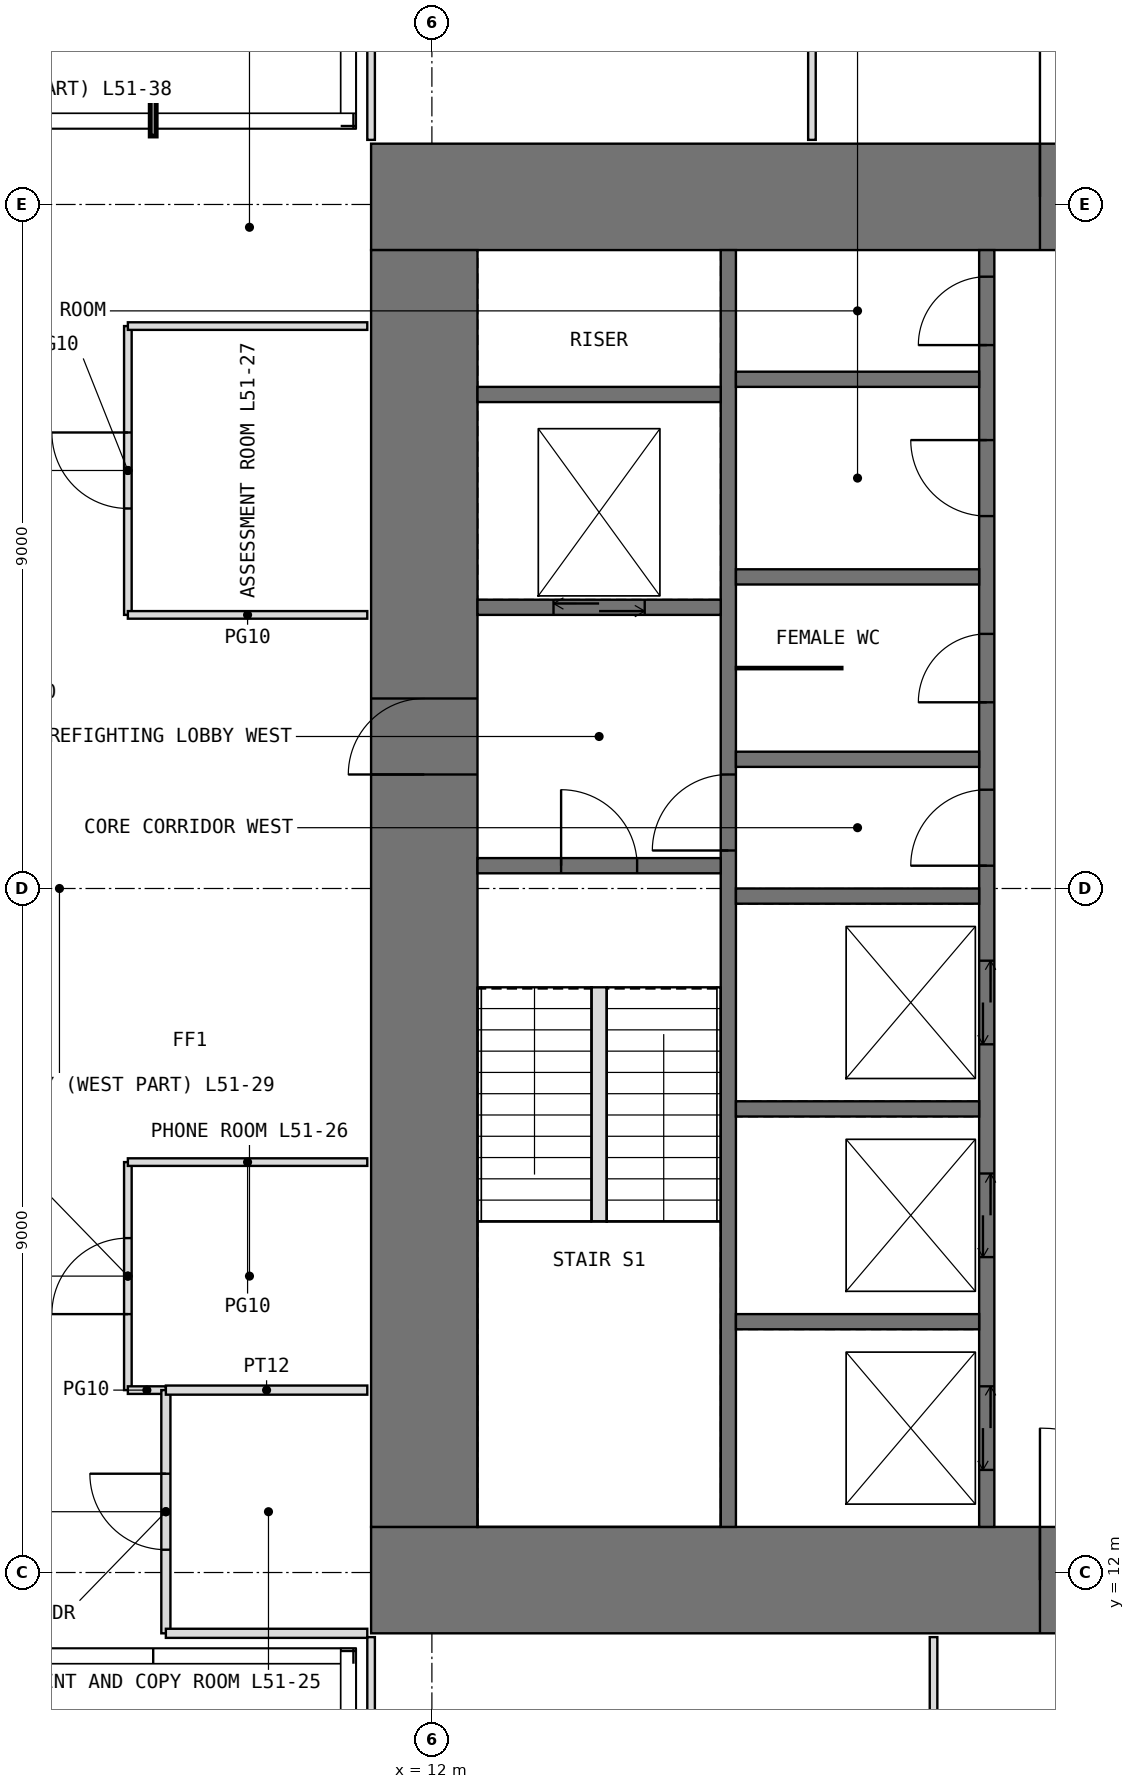
"""IFC4 building model, lengths in metres.
Left out: names, types, materials, properties, quantities, classifications, styles, units other than length and angle.
Written with IfcOpenShell. Run it as: python <this file> out.ifc"""

import sys

from ifc_helpers import new_model, si_unit, direction, frame, frame_2d, origin, place, context, subcontext, project, spatial, rectangle, extrude, element, fill, save


model = new_model("IFC4")
c1 = context("Model", 3, precision=1e-05, world=origin(), true_north=direction((0.0, 1.0)))
c2 = subcontext(c1, "Body", "Model", "MODEL_VIEW")
j1 = project(units=[si_unit("LENGTHUNIT", "METRE"), si_unit("PLANEANGLEUNIT", "RADIAN")], contexts=[c1])
p1 = place(None, origin())
s1 = spatial("IfcSite", under=j1, at=p1, CompositionType="ELEMENT")
p2 = place(p1, origin())
s2 = spatial("IfcBuilding", under=s1, at=p2, CompositionType="ELEMENT")
p3 = place(p2, frame((0.0, 0.0, 214.5)))
s3 = spatial("IfcBuildingStorey", under=s2, at=p3, CompositionType="ELEMENT", Elevation=214.5)
p4 = place(p3, frame((11.2, 11.9, -0.05), z_axis=(0.0, 0.0, 1.0), x_axis=(1.0, 0.0, 0.0)))
e1 = element("IfcWall", 1, at=p4, inside=s3, PredefinedType="SHEAR", context=c2, shape_type="SweptSolid", body=[
    extrude(rectangle(XDim=19.6, YDim=1.4, at=frame_2d((9.8, 0.0))), origin(), (0.0, 0.0, 1.0), 4.0),
])
p5 = place(p4, frame((8.8, 0.0, 0.05)))
e2 = element("IfcOpeningElement", 2, at=p5, cuts=e1, PredefinedType="OPENING", context=c2, shape_type="SweptSolid", body=[
    extrude(rectangle(XDim=2.0, YDim=2.2, at=frame_2d((1.0, 1.1))), frame((0.0, 0.71, 0.0), z_axis=(0.0, -1.0, 0.0), x_axis=(1.0, 0.0, 0.0)), (0.0, 0.0, 1.0), 1.42),
])
p6 = place(p3, frame((11.2, 30.1, -0.05), z_axis=(0.0, 0.0, 1.0), x_axis=(1.0, 0.0, 0.0)))
e3 = element("IfcWall", 3, at=p6, inside=s3, PredefinedType="SHEAR", context=c2, shape_type="SweptSolid", body=[
    extrude(rectangle(XDim=19.6, YDim=1.4, at=frame_2d((9.8, 0.0))), origin(), (0.0, 0.0, 1.0), 4.0),
])
p7 = place(p6, frame((8.8, 0.0, 0.05)))
e4 = element("IfcOpeningElement", 4, at=p7, cuts=e3, PredefinedType="OPENING", context=c2, shape_type="SweptSolid", body=[
    extrude(rectangle(XDim=2.0, YDim=2.2, at=frame_2d((1.0, 1.1))), frame((0.0, 0.71, 0.0), z_axis=(0.0, -1.0, 0.0), x_axis=(1.0, 0.0, 0.0)), (0.0, 0.0, 1.0), 1.42),
])
p8 = place(p3, frame((11.9, 12.6, -0.05), z_axis=(0.0, 0.0, 1.0), x_axis=(0.0, 1.0, 0.0)))
e5 = element("IfcWall", 5, at=p8, inside=s3, PredefinedType="SHEAR", context=c2, shape_type="SweptSolid", body=[
    extrude(rectangle(XDim=16.8, YDim=1.4, at=frame_2d((8.4, 0.0))), origin(), (0.0, 0.0, 1.0), 4.0),
])
p9 = place(p8, frame((9.9, 0.0, 0.05)))
e6 = element("IfcOpeningElement", 6, at=p9, cuts=e5, PredefinedType="OPENING", context=c2, shape_type="SweptSolid", body=[
    extrude(rectangle(XDim=1.0, YDim=2.2, at=frame_2d((0.5, 1.1))), frame((0.0, 0.71, 0.0), z_axis=(0.0, -1.0, 0.0), x_axis=(1.0, 0.0, 0.0)), (0.0, 0.0, 1.0), 1.42),
])
p10 = place(p3, frame((15.9, 12.6, -0.05), z_axis=(0.0, 0.0, 1.0), x_axis=(0.0, 1.0, 0.0)))
e7 = element("IfcWall", 7, at=p10, inside=s3, PredefinedType="SHEAR", context=c2, shape_type="SweptSolid", body=[
    extrude(rectangle(XDim=16.8, YDim=0.2, at=frame_2d((8.4, 0.0))), origin(), (0.0, 0.0, 1.0), 4.0),
])
p11 = place(p10, frame((8.9, 0.0, 0.05)))
e8 = element("IfcOpeningElement", 8, at=p11, cuts=e7, PredefinedType="OPENING", context=c2, shape_type="SweptSolid", body=[
    extrude(rectangle(XDim=1.0, YDim=2.2, at=frame_2d((0.5, 1.1))), frame((0.0, 0.11, 0.0), z_axis=(0.0, -1.0, 0.0), x_axis=(1.0, 0.0, 0.0)), (0.0, 0.0, 1.0), 0.22),
])
p12 = place(p3, frame((19.3, 12.6, -0.05), z_axis=(0.0, 0.0, 1.0), x_axis=(0.0, 1.0, 0.0)))
e9 = element("IfcWall", 9, at=p12, inside=s3, PredefinedType="SHEAR", context=c2, shape_type="SweptSolid", body=[
    extrude(rectangle(XDim=16.8, YDim=0.2, at=frame_2d((8.4, 0.0))), origin(), (0.0, 0.0, 1.0), 4.0),
])
p13 = place(p12, frame((8.7, 0.0, 0.05)))
e10 = element("IfcOpeningElement", 10, at=p13, cuts=e9, PredefinedType="OPENING", context=c2, shape_type="SweptSolid", body=[
    extrude(rectangle(XDim=1.0, YDim=2.2, at=frame_2d((0.5, 1.1))), frame((0.0, 0.11, 0.0), z_axis=(0.0, -1.0, 0.0), x_axis=(1.0, 0.0, 0.0)), (0.0, 0.0, 1.0), 0.22),
])
p14 = place(p12, frame((10.85, 0.0, 0.05)))
e11 = element("IfcOpeningElement", 11, at=p14, cuts=e9, PredefinedType="OPENING", context=c2, shape_type="SweptSolid", body=[
    extrude(rectangle(XDim=0.9, YDim=2.2, at=frame_2d((0.45, 1.1))), frame((0.0, 0.11, 0.0), z_axis=(0.0, -1.0, 0.0), x_axis=(1.0, 0.0, 0.0)), (0.0, 0.0, 1.0), 0.22),
])
p15 = place(p12, frame((13.3, 0.0, 0.05)))
e12 = element("IfcOpeningElement", 12, at=p15, cuts=e9, PredefinedType="OPENING", context=c2, shape_type="SweptSolid", body=[
    extrude(rectangle(XDim=1.0, YDim=2.2, at=frame_2d((0.5, 1.1))), frame((0.0, 0.11, 0.0), z_axis=(0.0, -1.0, 0.0), x_axis=(1.0, 0.0, 0.0)), (0.0, 0.0, 1.0), 0.22),
])
p16 = place(p12, frame((15.55, 0.0, 0.05)))
e13 = element("IfcOpeningElement", 13, at=p16, cuts=e9, PredefinedType="OPENING", context=c2, shape_type="SweptSolid", body=[
    extrude(rectangle(XDim=0.9, YDim=2.2, at=frame_2d((0.45, 1.1))), frame((0.0, 0.11, 0.0), z_axis=(0.0, -1.0, 0.0), x_axis=(1.0, 0.0, 0.0)), (0.0, 0.0, 1.0), 0.22),
])
p17 = place(p12, frame((0.75, 0.0, 0.05)))
e14 = element("IfcOpeningElement", 14, at=p17, cuts=e9, PredefinedType="OPENING", context=c2, shape_type="SweptSolid", body=[
    extrude(rectangle(XDim=1.1, YDim=2.2, at=frame_2d((0.55, 1.1))), frame((0.0, 0.11, 0.0), z_axis=(0.0, -1.0, 0.0), x_axis=(1.0, 0.0, 0.0)), (0.0, 0.0, 1.0), 0.22),
])
p18 = place(p12, frame((3.55, 0.0, 0.05)))
e15 = element("IfcOpeningElement", 15, at=p18, cuts=e9, PredefinedType="OPENING", context=c2, shape_type="SweptSolid", body=[
    extrude(rectangle(XDim=1.1, YDim=2.2, at=frame_2d((0.55, 1.1))), frame((0.0, 0.11, 0.0), z_axis=(0.0, -1.0, 0.0), x_axis=(1.0, 0.0, 0.0)), (0.0, 0.0, 1.0), 0.22),
])
p19 = place(p12, frame((6.35, 0.0, 0.05)))
e16 = element("IfcOpeningElement", 16, at=p19, cuts=e9, PredefinedType="OPENING", context=c2, shape_type="SweptSolid", body=[
    extrude(rectangle(XDim=1.1, YDim=2.2, at=frame_2d((0.55, 1.1))), frame((0.0, 0.11, 0.0), z_axis=(0.0, -1.0, 0.0), x_axis=(1.0, 0.0, 0.0)), (0.0, 0.0, 1.0), 0.22),
])
p20 = place(p3, frame((12.6, 21.3, -0.05), z_axis=(0.0, 0.0, 1.0), x_axis=(1.0, 0.0, 0.0)))
e17 = element("IfcWall", 17, at=p20, inside=s3, PredefinedType="SHEAR", context=c2, shape_type="SweptSolid", body=[
    extrude(rectangle(XDim=3.2, YDim=0.2, at=frame_2d((1.6, 0.0))), origin(), (0.0, 0.0, 1.0), 4.0),
])
p21 = place(p20, frame((1.1, 0.0, 0.05)))
e18 = element("IfcOpeningElement", 18, at=p21, cuts=e17, PredefinedType="OPENING", context=c2, shape_type="SweptSolid", body=[
    extrude(rectangle(XDim=1.0, YDim=2.2, at=frame_2d((0.5, 1.1))), frame((0.0, 0.11, 0.0), z_axis=(0.0, -1.0, 0.0), x_axis=(1.0, 0.0, 0.0)), (0.0, 0.0, 1.0), 0.22),
])
p22 = place(p3, frame((12.6, 24.7, -0.05), z_axis=(0.0, 0.0, 1.0), x_axis=(1.0, 0.0, 0.0)))
e19 = element("IfcWall", 19, at=p22, inside=s3, PredefinedType="SHEAR", context=c2, shape_type="SweptSolid", body=[
    extrude(rectangle(XDim=3.2, YDim=0.2, at=frame_2d((1.6, 0.0))), origin(), (0.0, 0.0, 1.0), 4.0),
])
p23 = place(p22, frame((1.0, 0.0, 0.05)))
e20 = element("IfcOpeningElement", 20, at=p23, cuts=e19, PredefinedType="OPENING", context=c2, shape_type="SweptSolid", body=[
    extrude(rectangle(XDim=1.2, YDim=2.2, at=frame_2d((0.6, 1.1))), frame((0.0, 0.11, 0.0), z_axis=(0.0, -1.0, 0.0), x_axis=(1.0, 0.0, 0.0)), (0.0, 0.0, 1.0), 0.22),
])
for number, where, z_axis, x_axis in (
    (21, (12.6, 27.5, -0.05), (0.0, 0.0, 1.0), (1.0, 0.0, 0.0)),
    (22, (16.0, 15.3, -0.05), (0.0, 0.0, 1.0), (1.0, 0.0, 0.0)),
    (23, (16.0, 18.1, -0.05), (0.0, 0.0, 1.0), (1.0, 0.0, 0.0)),
    (24, (16.0, 20.9, -0.05), (0.0, 0.0, 1.0), (1.0, 0.0, 0.0)),
    (25, (16.0, 22.7, -0.05), (0.0, 0.0, 1.0), (1.0, 0.0, 0.0)),
    (26, (16.0, 25.1, -0.05), (0.0, 0.0, 1.0), (1.0, 0.0, 0.0)),
    (27, (16.0, 27.7, -0.05), (0.0, 0.0, 1.0), (1.0, 0.0, 0.0)),
):
    element("IfcWall", number, at=place(p3, frame(where, z_axis=z_axis, x_axis=x_axis)), inside=s3, PredefinedType="SHEAR", context=c2, shape_type="SweptSolid", body=[
        extrude(rectangle(XDim=3.2, YDim=0.2, at=frame_2d((1.6, 0.0))), origin(), (0.0, 0.0, 1.0), 4.0),
    ])
p24 = place(p3, frame((16.0, 23.9, 0.0), z_axis=(0.0, 0.0, 1.0), x_axis=(1.0, 0.0, 0.0)))
e28 = element("IfcWall", 28, at=p24, inside=s3, PredefinedType="PARTITIONING", context=c2, shape_type="SweptSolid", body=[
    extrude(rectangle(XDim=1.4, YDim=0.03, at=frame_2d((0.7, 0.0))), origin(), (0.0, 0.0, 1.0), 3.75),
])
p25 = place(p3, frame((8.0, 14.4, 0.0), z_axis=(0.0, 0.0, 1.0), x_axis=(0.0, 1.0, 0.0)))
e29 = element("IfcWall", 29, at=p25, inside=s3, PredefinedType="PARTITIONING", context=c2, shape_type="SweptSolid", body=[
    extrude(rectangle(XDim=3.0, YDim=0.1, at=frame_2d((1.5, 0.0))), origin(), (0.0, 0.0, 1.0), 3.75),
])
p26 = place(p25, frame((1.0, 0.0, 0.0)))
e30 = element("IfcOpeningElement", 30, at=p26, cuts=e29, PredefinedType="OPENING", context=c2, shape_type="SweptSolid", body=[
    extrude(rectangle(XDim=1.0, YDim=2.4, at=frame_2d((0.5, 1.2))), frame((0.0, 0.06, 0.0), z_axis=(0.0, -1.0, 0.0), x_axis=(1.0, 0.0, 0.0)), (0.0, 0.0, 1.0), 0.12),
])
p27 = place(p3, frame((8.0, 14.4, 0.0), z_axis=(0.0, 0.0, 1.0), x_axis=(1.0, 0.0, 0.0)))
e31 = element("IfcWall", 31, at=p27, inside=s3, PredefinedType="PARTITIONING", context=c2, shape_type="SweptSolid", body=[
    extrude(rectangle(XDim=0.5, YDim=0.1, at=frame_2d((0.25, 0.0))), origin(), (0.0, 0.0, 1.0), 3.75),
])
p28 = place(p3, frame((8.0, 17.4, 0.0), z_axis=(0.0, 0.0, 1.0), x_axis=(1.0, 0.0, 0.0)))
e32 = element("IfcWall", 32, at=p28, inside=s3, PredefinedType="PARTITIONING", context=c2, shape_type="SweptSolid", body=[
    extrude(rectangle(XDim=3.15, YDim=0.1, at=frame_2d((1.575, 0.0))), origin(), (0.0, 0.0, 1.0), 3.75),
])
p29 = place(p3, frame((8.0, 24.6, 0.0), z_axis=(0.0, 0.0, 1.0), x_axis=(0.0, 1.0, 0.0)))
e33 = element("IfcWall", 33, at=p29, inside=s3, PredefinedType="PARTITIONING", context=c2, shape_type="SweptSolid", body=[
    extrude(rectangle(XDim=3.8, YDim=0.1, at=frame_2d((1.9, 0.0))), origin(), (0.0, 0.0, 1.0), 3.75),
])
p30 = place(p29, frame((1.4, 0.0, 0.0)))
e34 = element("IfcOpeningElement", 34, at=p30, cuts=e33, PredefinedType="OPENING", context=c2, shape_type="SweptSolid", body=[
    extrude(rectangle(XDim=1.0, YDim=2.4, at=frame_2d((0.5, 1.2))), frame((0.0, 0.06, 0.0), z_axis=(0.0, -1.0, 0.0), x_axis=(1.0, 0.0, 0.0)), (0.0, 0.0, 1.0), 0.12),
])
for number, where, z_axis, x_axis in (
    (35, (8.0, 24.6, 0.0), (0.0, 0.0, 1.0), (1.0, 0.0, 0.0)),
    (36, (8.0, 28.4, 0.0), (0.0, 0.0, 1.0), (1.0, 0.0, 0.0)),
):
    element("IfcWall", number, at=place(p3, frame(where, z_axis=z_axis, x_axis=x_axis)), inside=s3, PredefinedType="PARTITIONING", context=c2, shape_type="SweptSolid", body=[
        extrude(rectangle(XDim=3.15, YDim=0.1, at=frame_2d((1.575, 0.0))), origin(), (0.0, 0.0, 1.0), 3.75),
    ])
p31 = place(p3, frame((8.5, 11.2, 0.0), z_axis=(0.0, 0.0, 1.0), x_axis=(0.0, 1.0, 0.0)))
e37 = element("IfcWall", 37, at=p31, inside=s3, PredefinedType="PARTITIONING", context=c2, shape_type="SweptSolid", body=[
    extrude(rectangle(XDim=3.2, YDim=0.12, at=frame_2d((1.6, 0.0))), origin(), (0.0, 0.0, 1.0), 3.75),
])
p32 = place(p31, frame((1.1, 0.0, 0.0)))
e38 = element("IfcOpeningElement", 38, at=p32, cuts=e37, PredefinedType="OPENING", context=c2, shape_type="SweptSolid", body=[
    extrude(rectangle(XDim=1.0, YDim=2.2, at=frame_2d((0.5, 1.1))), frame((0.0, 0.07, 0.0), z_axis=(0.0, -1.0, 0.0), x_axis=(1.0, 0.0, 0.0)), (0.0, 0.0, 1.0), 0.14),
])
for number, where, z_axis, x_axis in (
    (39, (8.5, 11.2, 0.0), (0.0, 0.0, 1.0), (1.0, 0.0, 0.0)),
    (40, (8.5, 14.4, 0.0), (0.0, 0.0, 1.0), (1.0, 0.0, 0.0)),
):
    element("IfcWall", number, at=place(p3, frame(where, z_axis=z_axis, x_axis=x_axis)), inside=s3, PredefinedType="PARTITIONING", context=c2, shape_type="SweptSolid", body=[
        extrude(rectangle(XDim=2.65, YDim=0.12, at=frame_2d((1.325, 0.0))), origin(), (0.0, 0.0, 1.0), 3.75),
    ])
p33 = place(p3, frame((11.2, 5.6, 0.0), z_axis=(0.0, 0.0, 1.0), x_axis=(0.0, 1.0, 0.0)))
e41 = element("IfcWall", 41, at=p33, inside=s3, PredefinedType="PARTITIONING", context=c2, shape_type="SweptSolid", body=[
    extrude(rectangle(XDim=5.55, YDim=0.1, at=frame_2d((2.775, 0.0))), origin(), (0.0, 0.0, 1.0), 3.75),
])
for number, where, z_axis, x_axis in (
    (42, (11.2, 30.85, 0.0), (0.0, 0.0, 1.0), (0.0, 1.0, 0.0)),
    (43, (17.0, 30.85, 0.0), (0.0, 0.0, 1.0), (0.0, 1.0, 0.0)),
):
    element("IfcWall", number, at=place(p3, frame(where, z_axis=z_axis, x_axis=x_axis)), inside=s3, PredefinedType="PARTITIONING", context=c2, shape_type="SweptSolid", body=[
        extrude(rectangle(XDim=4.95, YDim=0.1, at=frame_2d((2.475, 0.0))), origin(), (0.0, 0.0, 1.0), 3.75),
    ])
p34 = place(p3, frame((18.6, 5.6, 0.0), z_axis=(0.0, 0.0, 1.0), x_axis=(0.0, 1.0, 0.0)))
e44 = element("IfcWall", 44, at=p34, inside=s3, PredefinedType="PARTITIONING", context=c2, shape_type="SweptSolid", body=[
    extrude(rectangle(XDim=5.55, YDim=0.1, at=frame_2d((2.775, 0.0))), origin(), (0.0, 0.0, 1.0), 3.75),
])
p35 = place(p3, frame((14.2, 16.62, 0.0), z_axis=(0.0, 0.0, 1.0), x_axis=(0.0, 1.0, 0.0)))
e45 = element("IfcWall", 45, at=p35, inside=s3, PredefinedType="PARTITIONING", context=c2, shape_type="SweptSolid", body=[
    extrude(rectangle(XDim=3.08, YDim=0.2, at=frame_2d((1.54, 0.0))), origin(), (0.0, 0.0, 1.0), 4.0),
])
p36 = place(p5, origin())
e46 = element("IfcDoor", 46, at=p36, inside=s3, OperationType="DOUBLE_DOOR_SINGLE_SWING", PredefinedType="DOOR", context=c2, shape_type="SweptSolid", body=[
    extrude(rectangle(XDim=2.0, YDim=2.2, at=frame_2d((1.0, 1.1))), frame((0.0, 0.025, 0.0), z_axis=(0.0, -1.0, 0.0), x_axis=(1.0, 0.0, 0.0)), (0.0, 0.0, 1.0), 0.05),
])
fill(e2, e46)
p37 = place(p7, origin())
e47 = element("IfcDoor", 47, at=p37, inside=s3, OperationType="DOUBLE_DOOR_SINGLE_SWING", PredefinedType="DOOR", context=c2, shape_type="SweptSolid", body=[
    extrude(rectangle(XDim=2.0, YDim=2.2, at=frame_2d((1.0, 1.1))), frame((0.0, 0.025, 0.0), z_axis=(0.0, -1.0, 0.0), x_axis=(1.0, 0.0, 0.0)), (0.0, 0.0, 1.0), 0.05),
])
fill(e4, e47)
p38 = place(p9, origin())
e48 = element("IfcDoor", 48, at=p38, inside=s3, OperationType="SINGLE_SWING_LEFT", PredefinedType="DOOR", context=c2, shape_type="SweptSolid", body=[
    extrude(rectangle(XDim=1.0, YDim=2.2, at=frame_2d((0.5, 1.1))), frame((0.0, 0.025, 0.0), z_axis=(0.0, -1.0, 0.0), x_axis=(1.0, 0.0, 0.0)), (0.0, 0.0, 1.0), 0.05),
])
fill(e6, e48)
p39 = place(p21, origin())
e49 = element("IfcDoor", 49, at=p39, inside=s3, OperationType="SINGLE_SWING_LEFT", PredefinedType="DOOR", context=c2, shape_type="SweptSolid", body=[
    extrude(rectangle(XDim=1.0, YDim=2.2, at=frame_2d((0.5, 1.1))), frame((0.0, 0.025, 0.0), z_axis=(0.0, -1.0, 0.0), x_axis=(1.0, 0.0, 0.0)), (0.0, 0.0, 1.0), 0.05),
])
fill(e18, e49)
p40 = place(p11, origin())
e50 = element("IfcDoor", 50, at=p40, inside=s3, OperationType="SINGLE_SWING_LEFT", PredefinedType="DOOR", context=c2, shape_type="SweptSolid", body=[
    extrude(rectangle(XDim=1.0, YDim=2.2, at=frame_2d((0.5, 1.1))), frame((0.0, 0.025, 0.0), z_axis=(0.0, -1.0, 0.0), x_axis=(1.0, 0.0, 0.0)), (0.0, 0.0, 1.0), 0.05),
])
fill(e8, e50)
p41 = place(p13, origin())
e51 = element("IfcDoor", 51, at=p41, inside=s3, OperationType="SINGLE_SWING_LEFT", PredefinedType="DOOR", context=c2, shape_type="SweptSolid", body=[
    extrude(rectangle(XDim=1.0, YDim=2.2, at=frame_2d((0.5, 1.1))), frame((0.0, 0.025, 0.0), z_axis=(0.0, -1.0, 0.0), x_axis=(1.0, 0.0, 0.0)), (0.0, 0.0, 1.0), 0.05),
])
fill(e10, e51)
p42 = place(p14, origin())
e52 = element("IfcDoor", 52, at=p42, inside=s3, OperationType="SINGLE_SWING_LEFT", PredefinedType="DOOR", context=c2, shape_type="SweptSolid", body=[
    extrude(rectangle(XDim=0.9, YDim=2.2, at=frame_2d((0.45, 1.1))), frame((0.0, 0.025, 0.0), z_axis=(0.0, -1.0, 0.0), x_axis=(1.0, 0.0, 0.0)), (0.0, 0.0, 1.0), 0.05),
])
fill(e11, e52)
p43 = place(p15, origin())
e53 = element("IfcDoor", 53, at=p43, inside=s3, OperationType="SINGLE_SWING_RIGHT", PredefinedType="DOOR", context=c2, shape_type="SweptSolid", body=[
    extrude(rectangle(XDim=1.0, YDim=2.2, at=frame_2d((0.5, 1.1))), frame((0.0, 0.025, 0.0), z_axis=(0.0, -1.0, 0.0), x_axis=(1.0, 0.0, 0.0)), (0.0, 0.0, 1.0), 0.05),
])
fill(e12, e53)
p44 = place(p16, origin())
e54 = element("IfcDoor", 54, at=p44, inside=s3, OperationType="SINGLE_SWING_LEFT", PredefinedType="DOOR", context=c2, shape_type="SweptSolid", body=[
    extrude(rectangle(XDim=0.9, YDim=2.2, at=frame_2d((0.45, 1.1))), frame((0.0, 0.025, 0.0), z_axis=(0.0, -1.0, 0.0), x_axis=(1.0, 0.0, 0.0)), (0.0, 0.0, 1.0), 0.05),
])
fill(e13, e54)
p45 = place(p32, origin())
e55 = element("IfcDoor", 55, at=p45, inside=s3, OperationType="SINGLE_SWING_RIGHT", PredefinedType="DOOR", context=c2, shape_type="SweptSolid", body=[
    extrude(rectangle(XDim=1.0, YDim=2.2, at=frame_2d((0.5, 1.1))), frame((0.0, 0.025, 0.0), z_axis=(0.0, -1.0, 0.0), x_axis=(1.0, 0.0, 0.0)), (0.0, 0.0, 1.0), 0.05),
])
fill(e38, e55)
p46 = place(p26, origin())
e56 = element("IfcDoor", 56, at=p46, inside=s3, OperationType="SINGLE_SWING_LEFT", PredefinedType="DOOR", context=c2, shape_type="SweptSolid", body=[
    extrude(rectangle(XDim=1.0, YDim=2.4, at=frame_2d((0.5, 1.2))), frame((0.0, 0.025, 0.0), z_axis=(0.0, -1.0, 0.0), x_axis=(1.0, 0.0, 0.0)), (0.0, 0.0, 1.0), 0.05),
])
fill(e30, e56)
p47 = place(p30, origin())
e57 = element("IfcDoor", 57, at=p47, inside=s3, OperationType="SINGLE_SWING_RIGHT", PredefinedType="DOOR", context=c2, shape_type="SweptSolid", body=[
    extrude(rectangle(XDim=1.0, YDim=2.4, at=frame_2d((0.5, 1.2))), frame((0.0, 0.025, 0.0), z_axis=(0.0, -1.0, 0.0), x_axis=(1.0, 0.0, 0.0)), (0.0, 0.0, 1.0), 0.05),
])
fill(e34, e57)
p48 = place(p17, origin())
e58 = element("IfcDoor", 58, at=p48, inside=s3, OperationType="DOUBLE_DOOR_SLIDING", PredefinedType="DOOR", context=c2, shape_type="SweptSolid", body=[
    extrude(rectangle(XDim=1.1, YDim=2.2, at=frame_2d((0.55, 1.1))), frame((0.0, 0.025, 0.0), z_axis=(0.0, -1.0, 0.0), x_axis=(1.0, 0.0, 0.0)), (0.0, 0.0, 1.0), 0.05),
])
fill(e14, e58)
p49 = place(p18, origin())
e59 = element("IfcDoor", 59, at=p49, inside=s3, OperationType="DOUBLE_DOOR_SLIDING", PredefinedType="DOOR", context=c2, shape_type="SweptSolid", body=[
    extrude(rectangle(XDim=1.1, YDim=2.2, at=frame_2d((0.55, 1.1))), frame((0.0, 0.025, 0.0), z_axis=(0.0, -1.0, 0.0), x_axis=(1.0, 0.0, 0.0)), (0.0, 0.0, 1.0), 0.05),
])
fill(e15, e59)
p50 = place(p19, origin())
e60 = element("IfcDoor", 60, at=p50, inside=s3, OperationType="DOUBLE_DOOR_SLIDING", PredefinedType="DOOR", context=c2, shape_type="SweptSolid", body=[
    extrude(rectangle(XDim=1.1, YDim=2.2, at=frame_2d((0.55, 1.1))), frame((0.0, 0.025, 0.0), z_axis=(0.0, -1.0, 0.0), x_axis=(1.0, 0.0, 0.0)), (0.0, 0.0, 1.0), 0.05),
])
fill(e16, e60)
p51 = place(p23, origin())
e61 = element("IfcDoor", 61, at=p51, inside=s3, OperationType="DOUBLE_DOOR_SLIDING", PredefinedType="DOOR", context=c2, shape_type="SweptSolid", body=[
    extrude(rectangle(XDim=1.2, YDim=2.2, at=frame_2d((0.6, 1.1))), frame((0.0, 0.025, 0.0), z_axis=(0.0, -1.0, 0.0), x_axis=(1.0, 0.0, 0.0)), (0.0, 0.0, 1.0), 0.05),
])
fill(e20, e61)
save(model, sys.argv[1])
